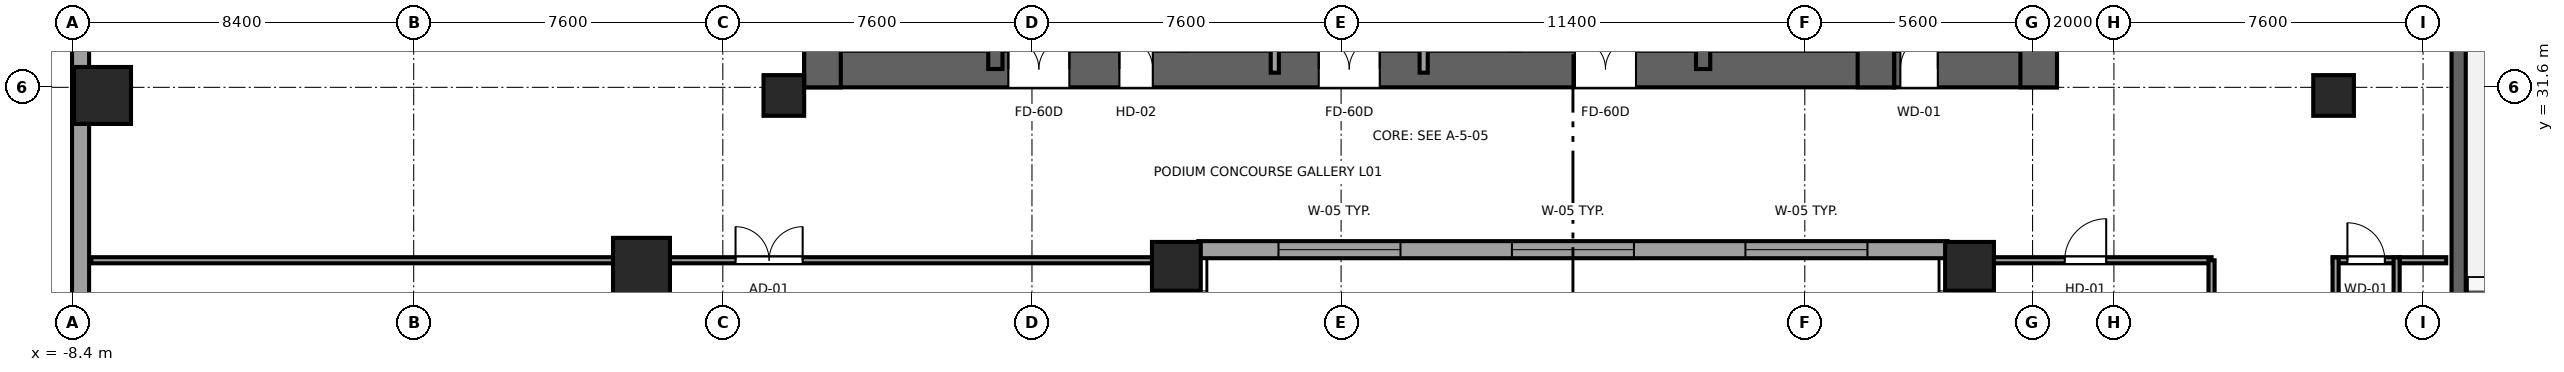
"""IFC4 building model, lengths in metres.
Left out: names, types, materials, properties, quantities, classifications, styles, units other than length and angle.
Written with IfcOpenShell. Run it as: python <this file> out.ifc"""

import sys

from ifc_helpers import new_model, si_unit, direction, frame, frame_2d, origin, origin_2d, place, context, subcontext, project, spatial, rectangle, circle, extrude, source, transform, mapped, element, fill, save


model = new_model("IFC4")
c1 = context("Model", 3, precision=1e-05, world=origin(), true_north=direction((0.0, 1.0)))
c2 = subcontext(c1, "Body", "Model", "MODEL_VIEW")
j1 = project(units=[si_unit("LENGTHUNIT", "METRE"), si_unit("PLANEANGLEUNIT", "RADIAN")], contexts=[c1])
p1 = place(None, origin())
s1 = spatial("IfcSite", under=j1, at=p1, CompositionType="ELEMENT")
p2 = place(p1, origin())
s2 = spatial("IfcBuilding", under=s1, at=p2, CompositionType="ELEMENT")
p3 = place(p2, frame((0.0, 0.0, 6.0)))
s3 = spatial("IfcBuildingStorey", under=s2, at=p3, CompositionType="ELEMENT", Elevation=6.0)
p4 = place(p3, frame((9.6, 32.05, 0.0), z_axis=(0.0, 0.0, 1.0), x_axis=(1.0, 0.0, 0.0)))
e1 = element("IfcWall", 1, at=p4, inside=s3, PredefinedType="SHEAR", context=c2, shape_type="SweptSolid", body=[
    extrude(rectangle(XDim=26.8, YDim=0.9, at=frame_2d((13.4, 0.0))), origin(), (0.0, 0.0, 1.0), 5.0),
])
p5 = place(p4, frame((6.52, 0.0, 0.0), z_axis=(0.0, 0.0, 1.0), x_axis=(-1.0, 0.0, 0.0)))
e2 = element("IfcOpeningElement", 2, at=p5, cuts=e1, PredefinedType="OPENING", context=c2, shape_type="SweptSolid", body=[
    extrude(rectangle(XDim=1.5, YDim=2.04, at=frame_2d((0.75, 1.02))), frame((0.0, 0.46, 0.0), z_axis=(0.0, -1.0, 0.0), x_axis=(1.0, 0.0, 0.0)), (0.0, 0.0, 1.0), 0.92),
])
p6 = place(p4, frame((14.15, 0.0, 0.0), z_axis=(0.0, 0.0, 1.0), x_axis=(-1.0, 0.0, 0.0)))
e3 = element("IfcOpeningElement", 3, at=p6, cuts=e1, PredefinedType="OPENING", context=c2, shape_type="SweptSolid", body=[
    extrude(rectangle(XDim=1.5, YDim=2.04, at=frame_2d((0.75, 1.02))), frame((0.0, 0.46, 0.0), z_axis=(0.0, -1.0, 0.0), x_axis=(1.0, 0.0, 0.0)), (0.0, 0.0, 1.0), 0.92),
])
p7 = place(p4, frame((20.45, 0.0, 0.0), z_axis=(0.0, 0.0, 1.0), x_axis=(-1.0, 0.0, 0.0)))
e4 = element("IfcOpeningElement", 4, at=p7, cuts=e1, PredefinedType="OPENING", context=c2, shape_type="SweptSolid", body=[
    extrude(rectangle(XDim=1.5, YDim=2.04, at=frame_2d((0.75, 1.02))), frame((0.0, 0.46, 0.0), z_axis=(0.0, -1.0, 0.0), x_axis=(1.0, 0.0, 0.0)), (0.0, 0.0, 1.0), 0.92),
])
p8 = place(p4, frame((8.57, 0.0, 0.0), z_axis=(0.0, 0.0, 1.0), x_axis=(-1.0, 0.0, 0.0)))
e5 = element("IfcOpeningElement", 5, at=p8, cuts=e1, PredefinedType="OPENING", context=c2, shape_type="SweptSolid", body=[
    extrude(rectangle(XDim=0.82, YDim=2.01, at=frame_2d((0.41, 1.005))), frame((0.0, 0.46, 0.0), z_axis=(0.0, -1.0, 0.0), x_axis=(1.0, 0.0, 0.0)), (0.0, 0.0, 1.0), 0.92),
])
for number, where, z_axis, x_axis in (
    (6, (10.05, 31.6, 0.0), (0.0, 0.0, 1.0), (0.0, 1.0, 0.0)),
    (7, (35.95, 31.6, 0.0), (0.0, 0.0, 1.0), (0.0, 1.0, 0.0)),
):
    element("IfcWall", number, at=place(p3, frame(where, z_axis=z_axis, x_axis=x_axis)), inside=s3, PredefinedType="SHEAR", context=c2, shape_type="SweptSolid", body=[
        extrude(rectangle(XDim=13.6, YDim=0.9, at=frame_2d((6.8, 0.0))), origin(), (0.0, 0.0, 1.0), 5.0),
    ])
p9 = place(p3, frame((14.3, 32.05, 0.0), z_axis=(0.0, 0.0, 1.0), x_axis=(0.0, 1.0, 0.0)))
e8 = element("IfcWall", 8, at=p9, inside=s3, PredefinedType="SHEAR", context=c2, shape_type="SweptSolid", body=[
    extrude(rectangle(XDim=12.7, YDim=0.35, at=frame_2d((6.35, 0.0))), origin(), (0.0, 0.0, 1.0), 5.0),
])
p10 = place(p9, frame((0.5, 0.0, 0.0)))
e9 = element("IfcOpeningElement", 9, at=p10, cuts=e8, PredefinedType="OPENING", context=c2, shape_type="SweptSolid", body=[
    extrude(rectangle(XDim=1.1, YDim=2.12, at=frame_2d((0.55, 1.06))), frame((0.0, 0.185, 0.0), z_axis=(0.0, -1.0, 0.0), x_axis=(1.0, 0.0, 0.0)), (0.0, 0.0, 1.0), 0.37),
])
p11 = place(p3, frame((31.7, 32.05, 0.0), z_axis=(0.0, 0.0, 1.0), x_axis=(0.0, 1.0, 0.0)))
e10 = element("IfcWall", 10, at=p11, inside=s3, PredefinedType="SHEAR", context=c2, shape_type="SweptSolid", body=[
    extrude(rectangle(XDim=12.7, YDim=0.35, at=frame_2d((6.35, 0.0))), origin(), (0.0, 0.0, 1.0), 5.0),
])
p12 = place(p11, frame((1.6, 0.0, 0.0), z_axis=(0.0, 0.0, 1.0), x_axis=(-1.0, 0.0, 0.0)))
e11 = element("IfcOpeningElement", 11, at=p12, cuts=e10, PredefinedType="OPENING", context=c2, shape_type="SweptSolid", body=[
    extrude(rectangle(XDim=1.1, YDim=2.12, at=frame_2d((0.55, 1.06))), frame((0.0, 0.185, 0.0), z_axis=(0.0, -1.0, 0.0), x_axis=(1.0, 0.0, 0.0)), (0.0, 0.0, 1.0), 0.37),
])
p13 = place(p3, frame((36.4, 32.05, 0.0), z_axis=(0.0, 0.0, 1.0), x_axis=(1.0, 0.0, 0.0)))
e12 = element("IfcWall", 12, at=p13, inside=s3, PredefinedType="SHEAR", context=c2, shape_type="SweptSolid", body=[
    extrude(rectangle(XDim=4.0, YDim=0.9, at=frame_2d((2.0, 0.0))), origin(), (0.0, 0.0, 1.0), 5.0),
])
p14 = place(p13, frame((1.07, 0.0, 0.0), z_axis=(0.0, 0.0, 1.0), x_axis=(-1.0, 0.0, 0.0)))
e13 = element("IfcOpeningElement", 13, at=p14, cuts=e12, PredefinedType="OPENING", context=c2, shape_type="SweptSolid", body=[
    extrude(rectangle(XDim=0.92, YDim=2.01, at=frame_2d((0.46, 1.005))), frame((0.0, 0.46, 0.0), z_axis=(0.0, -1.0, 0.0), x_axis=(1.0, 0.0, 0.0)), (0.0, 0.0, 1.0), 0.92),
])
p15 = place(p3, frame((39.95, 31.6, 0.0), z_axis=(0.0, 0.0, 1.0), x_axis=(0.0, 1.0, 0.0)))
e14 = element("IfcWall", 14, at=p15, inside=s3, PredefinedType="SHEAR", context=c2, shape_type="SweptSolid", body=[
    extrude(rectangle(XDim=13.6, YDim=0.9, at=frame_2d((6.8, 0.0))), origin(), (0.0, 0.0, 1.0), 5.0),
])
p16 = place(p3, frame((50.275, 32.975, 0.0), z_axis=(0.0, 0.0, 1.0), x_axis=(0.0, -1.0, 0.0)))
e15 = element("IfcWall", 15, at=p16, inside=s3, PredefinedType="SHEAR", context=c2, shape_type="SweptSolid", body=[
    extrude(rectangle(XDim=12.95, YDim=0.35, at=frame_2d((6.475, 0.0))), origin(), (0.0, 0.0, 1.0), 5.0),
])
m1 = source(origin(), c2, "Body", "SweptSolid", [
    extrude(rectangle(XDim=1.4, YDim=1.4, at=origin_2d()), origin(), (0.0, 0.0, 1.0), 5.0),
])
p17 = place(p3, frame((-7.65, 31.4, 0.0), z_axis=(0.0, 0.0, 1.0), x_axis=(1.0, 0.0, 0.0)))
e16 = element("IfcColumn", 16, at=p17, inside=s3, PredefinedType="COLUMN", context=c2, shape_type="MappedRepresentation", body=[
    mapped(m1, transform((0.0, 0.0, 0.0), x_axis=(1.0, 0.0, 0.0), y_axis=(0.0, 1.0, 0.0), z_axis=(0.0, 0.0, 1.0), scale=1.0)),
])
m2 = source(origin(), c2, "Body", "SweptSolid", [
    extrude(circle(Radius=0.6, at=origin_2d()), origin(), (0.0, 0.0, 1.0), 5.0),
])
for number, where, z_axis, x_axis in (
    (17, (18.75, 27.2, 0.0), (0.0, 0.0, 1.0), (1.0, 0.0, 0.0)),
    (18, (38.25, 27.2, 0.0), (0.0, 0.0, 1.0), (1.0, 0.0, 0.0)),
):
    element("IfcColumn", number, at=place(p3, frame(where, z_axis=z_axis, x_axis=x_axis)), inside=s3, PredefinedType="COLUMN", context=c2, shape_type="MappedRepresentation", body=[
        mapped(m2, transform((0.0, 0.0, 0.0), x_axis=(1.0, 0.0, 0.0), y_axis=(0.0, 1.0, 0.0), z_axis=(0.0, 0.0, 1.0), scale=1.0)),
    ])
m3 = source(origin(), c2, "Body", "SweptSolid", [
    extrude(rectangle(XDim=1.0, YDim=1.0, at=origin_2d()), origin(), (0.0, 0.0, 1.0), 5.0),
])
for number, where, z_axis, x_axis in (
    (19, (47.2, 31.4, 0.0), (0.0, 0.0, 1.0), (1.0, 0.0, 0.0)),
    (20, (9.1, 31.4, 0.0), (0.0, 0.0, 1.0), (1.0, 0.0, 0.0)),
):
    element("IfcColumn", number, at=place(p3, frame(where, z_axis=z_axis, x_axis=x_axis)), inside=s3, PredefinedType="COLUMN", context=c2, shape_type="MappedRepresentation", body=[
        mapped(m3, transform((0.0, 0.0, 0.0), x_axis=(1.0, 0.0, 0.0), y_axis=(0.0, 1.0, 0.0), z_axis=(0.0, 0.0, 1.0), scale=1.0)),
    ])
p18 = place(p3, frame((5.6, 27.2, 0.0), z_axis=(0.0, 0.0, 1.0), x_axis=(1.0, 0.0, 0.0)))
e21 = element("IfcColumn", 21, at=p18, inside=s3, PredefinedType="COLUMN", context=c2, shape_type="MappedRepresentation", body=[
    mapped(m1, transform((0.0, 0.0, 0.0), x_axis=(1.0, 0.0, 0.0), y_axis=(0.0, 1.0, 0.0), z_axis=(0.0, 0.0, 1.0), scale=1.0)),
])
p19 = place(p3, frame((19.29, 27.61, 0.0), z_axis=(0.0, 0.0, 1.0), x_axis=(1.0, 0.0, 0.0)))
e22 = element("IfcWall", 22, at=p19, inside=s3, PredefinedType="SOLIDWALL", context=c2, shape_type="SweptSolid", body=[
    extrude(rectangle(XDim=18.42, YDim=0.42, at=frame_2d((9.21, 0.0))), origin(), (0.0, 0.0, 1.0), 4.74),
])
p20 = place(p19, frame((1.97, 0.0, 0.65)))
e23 = element("IfcOpeningElement", 23, at=p20, cuts=e22, PredefinedType="OPENING", context=c2, shape_type="SweptSolid", body=[
    extrude(rectangle(XDim=3.0, YDim=2.5, at=frame_2d((1.5, 1.25))), frame((0.0, 0.22, 0.0), z_axis=(0.0, -1.0, 0.0), x_axis=(1.0, 0.0, 0.0)), (0.0, 0.0, 1.0), 0.44),
])
p21 = place(p19, frame((7.71, 0.0, 0.65)))
e24 = element("IfcOpeningElement", 24, at=p21, cuts=e22, PredefinedType="OPENING", context=c2, shape_type="SweptSolid", body=[
    extrude(rectangle(XDim=3.0, YDim=2.5, at=frame_2d((1.5, 1.25))), frame((0.0, 0.22, 0.0), z_axis=(0.0, -1.0, 0.0), x_axis=(1.0, 0.0, 0.0)), (0.0, 0.0, 1.0), 0.44),
])
p22 = place(p19, frame((13.45, 0.0, 0.65)))
e25 = element("IfcOpeningElement", 25, at=p22, cuts=e22, PredefinedType="OPENING", context=c2, shape_type="SweptSolid", body=[
    extrude(rectangle(XDim=3.0, YDim=2.5, at=frame_2d((1.5, 1.25))), frame((0.0, 0.22, 0.0), z_axis=(0.0, -1.0, 0.0), x_axis=(1.0, 0.0, 0.0)), (0.0, 0.0, 1.0), 0.44),
])
p23 = place(p3, frame((-8.19, 48.29, 0.0), z_axis=(0.0, 0.0, 1.0), x_axis=(0.0, -1.0, 0.0)))
e26 = element("IfcWall", 26, at=p23, inside=s3, PredefinedType="SOLIDWALL", context=c2, shape_type="SweptSolid", body=[
    extrude(rectangle(XDim=50.58, YDim=0.42, at=frame_2d((25.29, 0.0))), origin(), (0.0, 0.0, 1.0), 4.74),
])
p24 = place(p23, frame((5.834, 0.0, 0.65)))
e27 = element("IfcOpeningElement", 27, at=p24, cuts=e26, PredefinedType="OPENING", context=c2, shape_type="SweptSolid", body=[
    extrude(rectangle(XDim=3.0, YDim=2.5, at=frame_2d((1.5, 1.25))), frame((0.0, 0.22, 0.0), z_axis=(0.0, -1.0, 0.0), x_axis=(1.0, 0.0, 0.0)), (0.0, 0.0, 1.0), 0.44),
])
p25 = place(p23, frame((10.323, 0.0, 0.65)))
e28 = element("IfcOpeningElement", 28, at=p25, cuts=e26, PredefinedType="OPENING", context=c2, shape_type="SweptSolid", body=[
    extrude(rectangle(XDim=3.0, YDim=2.5, at=frame_2d((1.5, 1.25))), frame((0.0, 0.22, 0.0), z_axis=(0.0, -1.0, 0.0), x_axis=(1.0, 0.0, 0.0)), (0.0, 0.0, 1.0), 0.44),
])
p26 = place(p23, frame((24.84, 0.0, 0.65)))
e29 = element("IfcOpeningElement", 29, at=p26, cuts=e26, PredefinedType="OPENING", context=c2, shape_type="SweptSolid", body=[
    extrude(rectangle(XDim=3.0, YDim=2.5, at=frame_2d((1.5, 1.25))), frame((0.0, 0.22, 0.0), z_axis=(0.0, -1.0, 0.0), x_axis=(1.0, 0.0, 0.0)), (0.0, 0.0, 1.0), 0.44),
])
p27 = place(p23, frame((28.279, 0.0, 0.65)))
e30 = element("IfcOpeningElement", 30, at=p27, cuts=e26, PredefinedType="OPENING", context=c2, shape_type="SweptSolid", body=[
    extrude(rectangle(XDim=3.0, YDim=2.5, at=frame_2d((1.5, 1.25))), frame((0.0, 0.22, 0.0), z_axis=(0.0, -1.0, 0.0), x_axis=(1.0, 0.0, 0.0)), (0.0, 0.0, 1.0), 0.44),
])
p28 = place(p23, frame((33.318, 0.0, 0.65)))
e31 = element("IfcOpeningElement", 31, at=p28, cuts=e26, PredefinedType="OPENING", context=c2, shape_type="SweptSolid", body=[
    extrude(rectangle(XDim=3.0, YDim=2.5, at=frame_2d((1.5, 1.25))), frame((0.0, 0.22, 0.0), z_axis=(0.0, -1.0, 0.0), x_axis=(1.0, 0.0, 0.0)), (0.0, 0.0, 1.0), 0.44),
])
p29 = place(p23, frame((41.746, 0.0, 0.65)))
e32 = element("IfcOpeningElement", 32, at=p29, cuts=e26, PredefinedType="OPENING", context=c2, shape_type="SweptSolid", body=[
    extrude(rectangle(XDim=3.0, YDim=2.5, at=frame_2d((1.5, 1.25))), frame((0.0, 0.22, 0.0), z_axis=(0.0, -1.0, 0.0), x_axis=(1.0, 0.0, 0.0)), (0.0, 0.0, 1.0), 0.44),
])
for number, where, z_axis, x_axis in (
    (33, (21.17, 31.96, 0.0), (0.0, 0.0, 1.0), (0.0, 1.0, 0.0)),
    (34, (24.83, 31.96, 0.0), (0.0, 0.0, 1.0), (0.0, 1.0, 0.0)),
):
    element("IfcWall", number, at=place(p3, frame(where, z_axis=z_axis, x_axis=x_axis)), inside=s3, PredefinedType="SOLIDWALL", context=c2, shape_type="SweptSolid", body=[
        extrude(rectangle(XDim=12.58, YDim=0.2, at=frame_2d((6.29, 0.0))), origin(), (0.0, 0.0, 1.0), 4.74),
    ])
p30 = place(p3, frame((-7.925, 27.35, 0.0), z_axis=(0.0, 0.0, 1.0), x_axis=(1.0, 0.0, 0.0)))
e35 = element("IfcWall", 35, at=p30, inside=s3, PredefinedType="PARTITIONING", context=c2, shape_type="SweptSolid", body=[
    extrude(rectangle(XDim=26.925, YDim=0.15, at=frame_2d((13.462, 0.0))), origin(), (0.0, 0.0, 1.0), 3.53),
])
p31 = place(p30, frame((15.837, 0.0, 0.0)))
e36 = element("IfcOpeningElement", 36, at=p31, cuts=e35, PredefinedType="OPENING", context=c2, shape_type="SweptSolid", body=[
    extrude(rectangle(XDim=1.65, YDim=2.15, at=frame_2d((0.825, 1.075))), frame((0.0, 0.085, 0.0), z_axis=(0.0, -1.0, 0.0), x_axis=(1.0, 0.0, 0.0)), (0.0, 0.0, 1.0), 0.17),
])
p32 = place(p3, frame((19.0, -2.025, 0.0), z_axis=(0.0, 0.0, 1.0), x_axis=(0.0, 1.0, 0.0)))
e37 = element("IfcWall", 37, at=p32, inside=s3, PredefinedType="PARTITIONING", context=c2, shape_type="SweptSolid", body=[
    extrude(rectangle(XDim=29.425, YDim=0.15, at=frame_2d((14.712, 0.0))), origin(), (0.0, 0.0, 1.0), 4.74),
])
p33 = place(p3, frame((38.0, 27.35, 0.0), z_axis=(0.0, 0.0, 1.0), x_axis=(1.0, 0.0, 0.0)))
e38 = element("IfcWall", 38, at=p33, inside=s3, PredefinedType="PARTITIONING", context=c2, shape_type="SweptSolid", body=[
    extrude(rectangle(XDim=6.2, YDim=0.15, at=frame_2d((3.1, 0.0))), origin(), (0.0, 0.0, 1.0), 4.74),
])
p34 = place(p33, frame((2.59, 0.0, 0.0)))
e39 = element("IfcOpeningElement", 39, at=p34, cuts=e38, PredefinedType="OPENING", context=c2, shape_type="SweptSolid", body=[
    extrude(rectangle(XDim=1.02, YDim=2.03, at=frame_2d((0.51, 1.015))), frame((0.0, 0.085, 0.0), z_axis=(0.0, -1.0, 0.0), x_axis=(1.0, 0.0, 0.0)), (0.0, 0.0, 1.0), 0.17),
])
p35 = place(p3, frame((38.0, 20.0, 0.0), z_axis=(0.0, 0.0, 1.0), x_axis=(0.0, 1.0, 0.0)))
e40 = element("IfcWall", 40, at=p35, inside=s3, PredefinedType="PARTITIONING", context=c2, shape_type="SweptSolid", body=[
    extrude(rectangle(XDim=7.4, YDim=0.15, at=frame_2d((3.7, 0.0))), origin(), (0.0, 0.0, 1.0), 4.74),
])
p36 = place(p3, frame((44.2, 20.0, 0.0), z_axis=(0.0, 0.0, 1.0), x_axis=(0.0, 1.0, 0.0)))
e41 = element("IfcWall", 41, at=p36, inside=s3, PredefinedType="PARTITIONING", context=c2, shape_type="SweptSolid", body=[
    extrude(rectangle(XDim=7.35, YDim=0.15, at=frame_2d((3.675, 0.0))), origin(), (0.0, 0.0, 1.0), 4.276),
])
p37 = place(p3, frame((47.18, 27.35, 0.0), z_axis=(0.0, 0.0, 1.0), x_axis=(1.0, 0.0, 0.0)))
e42 = element("IfcWall", 42, at=p37, inside=s3, PredefinedType="PARTITIONING", context=c2, shape_type="SweptSolid", body=[
    extrude(rectangle(XDim=1.64, YDim=0.15, at=frame_2d((0.82, 0.0))), origin(), (0.0, 0.0, 1.0), 4.74),
])
p38 = place(p37, frame((0.36, 0.0, 0.0)))
e43 = element("IfcOpeningElement", 43, at=p38, cuts=e42, PredefinedType="OPENING", context=c2, shape_type="SweptSolid", body=[
    extrude(rectangle(XDim=0.92, YDim=2.01, at=frame_2d((0.46, 1.005))), frame((0.0, 0.085, 0.0), z_axis=(0.0, -1.0, 0.0), x_axis=(1.0, 0.0, 0.0)), (0.0, 0.0, 1.0), 0.17),
])
p39 = place(p3, frame((47.25, 19.98, 0.0), z_axis=(0.0, 0.0, 1.0), x_axis=(0.0, 1.0, 0.0)))
e44 = element("IfcWall", 44, at=p39, inside=s3, PredefinedType="PARTITIONING", context=c2, shape_type="SweptSolid", body=[
    extrude(rectangle(XDim=7.44, YDim=0.15, at=frame_2d((3.72, 0.0))), origin(), (0.0, 0.0, 1.0), 3.914),
])
p40 = place(p3, frame((48.75, 19.98, 0.0), z_axis=(0.0, 0.0, 1.0), x_axis=(0.0, 1.0, 0.0)))
e45 = element("IfcWall", 45, at=p40, inside=s3, PredefinedType="PARTITIONING", context=c2, shape_type="SweptSolid", body=[
    extrude(rectangle(XDim=7.44, YDim=0.15, at=frame_2d((3.72, 0.0))), origin(), (0.0, 0.0, 1.0), 4.74),
])
p41 = place(p40, frame((2.66, 0.0, 0.0)))
e46 = element("IfcOpeningElement", 46, at=p41, cuts=e45, PredefinedType="OPENING", context=c2, shape_type="SweptSolid", body=[
    extrude(rectangle(XDim=0.92, YDim=2.01, at=frame_2d((0.46, 1.005))), frame((0.0, 0.085, 0.0), z_axis=(0.0, -1.0, 0.0), x_axis=(1.0, 0.0, 0.0)), (0.0, 0.0, 1.0), 0.17),
])
p42 = place(p3, frame((48.83, 27.35, 0.0), z_axis=(0.0, 0.0, 1.0), x_axis=(1.0, 0.0, 0.0)))
e47 = element("IfcWall", 47, at=p42, inside=s3, PredefinedType="PARTITIONING", context=c2, shape_type="SweptSolid", body=[
    extrude(rectangle(XDim=1.14, YDim=0.15, at=frame_2d((0.57, 0.0))), origin(), (0.0, 0.0, 1.0), 4.74),
])
m4 = source(origin(), c2, "Body", "SweptSolid", [
    extrude(rectangle(XDim=3.0, YDim=2.5, at=frame_2d((1.5, 1.25))), frame((0.0, 0.09, 0.0), z_axis=(0.0, -1.0, 0.0), x_axis=(1.0, 0.0, 0.0)), (0.0, 0.0, 1.0), 0.06),
])
p43 = place(p20, origin())
e48 = element("IfcWindow", 48, at=p43, inside=s3, PartitioningType="TRIPLE_PANEL_HORIZONTAL", PredefinedType="WINDOW", context=c2, shape_type="MappedRepresentation", body=[
    mapped(m4, transform((0.0, 0.0, 0.0), x_axis=(1.0, 0.0, 0.0), y_axis=(0.0, 1.0, 0.0), z_axis=(0.0, 0.0, 1.0), scale=1.0)),
])
fill(e23, e48)
p44 = place(p21, origin())
e49 = element("IfcWindow", 49, at=p44, inside=s3, PartitioningType="TRIPLE_PANEL_HORIZONTAL", PredefinedType="WINDOW", context=c2, shape_type="MappedRepresentation", body=[
    mapped(m4, transform((0.0, 0.0, 0.0), x_axis=(1.0, 0.0, 0.0), y_axis=(0.0, 1.0, 0.0), z_axis=(0.0, 0.0, 1.0), scale=1.0)),
])
fill(e24, e49)
p45 = place(p22, origin())
e50 = element("IfcWindow", 50, at=p45, inside=s3, PartitioningType="TRIPLE_PANEL_HORIZONTAL", PredefinedType="WINDOW", context=c2, shape_type="MappedRepresentation", body=[
    mapped(m4, transform((0.0, 0.0, 0.0), x_axis=(1.0, 0.0, 0.0), y_axis=(0.0, 1.0, 0.0), z_axis=(0.0, 0.0, 1.0), scale=1.0)),
])
fill(e25, e50)
m5 = source(origin(), c2, "Body", "SweptSolid", [
    extrude(rectangle(XDim=1.5, YDim=2.04, at=frame_2d((0.75, 1.02))), frame((0.0, 0.025, 0.0), z_axis=(0.0, -1.0, 0.0), x_axis=(1.0, 0.0, 0.0)), (0.0, 0.0, 1.0), 0.05),
])
p46 = place(p5, origin())
e51 = element("IfcDoor", 51, at=p46, inside=s3, OperationType="DOUBLE_DOOR_SINGLE_SWING", PredefinedType="DOOR", context=c2, shape_type="MappedRepresentation", body=[
    mapped(m5, transform((0.0, 0.0, 0.0), x_axis=(1.0, 0.0, 0.0), y_axis=(0.0, 1.0, 0.0), z_axis=(0.0, 0.0, 1.0), scale=1.0)),
])
fill(e2, e51)
p47 = place(p6, origin())
e52 = element("IfcDoor", 52, at=p47, inside=s3, OperationType="DOUBLE_DOOR_SINGLE_SWING", PredefinedType="DOOR", context=c2, shape_type="MappedRepresentation", body=[
    mapped(m5, transform((0.0, 0.0, 0.0), x_axis=(1.0, 0.0, 0.0), y_axis=(0.0, 1.0, 0.0), z_axis=(0.0, 0.0, 1.0), scale=1.0)),
])
fill(e3, e52)
p48 = place(p7, origin())
e53 = element("IfcDoor", 53, at=p48, inside=s3, OperationType="DOUBLE_DOOR_SINGLE_SWING", PredefinedType="DOOR", context=c2, shape_type="MappedRepresentation", body=[
    mapped(m5, transform((0.0, 0.0, 0.0), x_axis=(1.0, 0.0, 0.0), y_axis=(0.0, 1.0, 0.0), z_axis=(0.0, 0.0, 1.0), scale=1.0)),
])
fill(e4, e53)
m6 = source(origin(), c2, "Body", "SweptSolid", [
    extrude(rectangle(XDim=0.82, YDim=2.01, at=frame_2d((0.41, 1.005))), frame((0.0, 0.025, 0.0), z_axis=(0.0, -1.0, 0.0), x_axis=(1.0, 0.0, 0.0)), (0.0, 0.0, 1.0), 0.05),
])
p49 = place(p8, origin())
e54 = element("IfcDoor", 54, at=p49, inside=s3, OperationType="SINGLE_SWING_LEFT", PredefinedType="DOOR", context=c2, shape_type="MappedRepresentation", body=[
    mapped(m6, transform((0.0, 0.0, 0.0), x_axis=(1.0, 0.0, 0.0), y_axis=(0.0, 1.0, 0.0), z_axis=(0.0, 0.0, 1.0), scale=1.0)),
])
fill(e5, e54)
m7 = source(origin(), c2, "Body", "SweptSolid", [
    extrude(rectangle(XDim=0.92, YDim=2.01, at=frame_2d((0.46, 1.005))), frame((0.0, 0.025, 0.0), z_axis=(0.0, -1.0, 0.0), x_axis=(1.0, 0.0, 0.0)), (0.0, 0.0, 1.0), 0.05),
])
p50 = place(p14, origin())
e55 = element("IfcDoor", 55, at=p50, inside=s3, OperationType="SINGLE_SWING_RIGHT", PredefinedType="DOOR", context=c2, shape_type="MappedRepresentation", body=[
    mapped(m7, transform((0.0, 0.0, 0.0), x_axis=(1.0, 0.0, 0.0), y_axis=(0.0, 1.0, 0.0), z_axis=(0.0, 0.0, 1.0), scale=1.0)),
])
fill(e13, e55)
m8 = source(origin(), c2, "Body", "SweptSolid", [
    extrude(rectangle(XDim=1.65, YDim=2.15, at=frame_2d((0.825, 1.075))), frame((0.0, 0.025, 0.0), z_axis=(0.0, -1.0, 0.0), x_axis=(1.0, 0.0, 0.0)), (0.0, 0.0, 1.0), 0.05),
])
p51 = place(p31, origin())
e56 = element("IfcDoor", 56, at=p51, inside=s3, OperationType="DOUBLE_DOOR_SINGLE_SWING", PredefinedType="DOOR", context=c2, shape_type="MappedRepresentation", body=[
    mapped(m8, transform((0.0, 0.0, 0.0), x_axis=(1.0, 0.0, 0.0), y_axis=(0.0, 1.0, 0.0), z_axis=(0.0, 0.0, 1.0), scale=1.0)),
])
fill(e36, e56)
m9 = source(origin(), c2, "Body", "SweptSolid", [
    extrude(rectangle(XDim=1.02, YDim=2.03, at=frame_2d((0.51, 1.015))), frame((0.0, 0.025, 0.0), z_axis=(0.0, -1.0, 0.0), x_axis=(1.0, 0.0, 0.0)), (0.0, 0.0, 1.0), 0.05),
])
p52 = place(p34, origin())
e57 = element("IfcDoor", 57, at=p52, inside=s3, OperationType="SINGLE_SWING_RIGHT", PredefinedType="DOOR", context=c2, shape_type="MappedRepresentation", body=[
    mapped(m9, transform((0.0, 0.0, 0.0), x_axis=(1.0, 0.0, 0.0), y_axis=(0.0, 1.0, 0.0), z_axis=(0.0, 0.0, 1.0), scale=1.0)),
])
fill(e39, e57)
p53 = place(p38, origin())
e58 = element("IfcDoor", 58, at=p53, inside=s3, OperationType="SINGLE_SWING_LEFT", PredefinedType="DOOR", context=c2, shape_type="MappedRepresentation", body=[
    mapped(m7, transform((0.0, 0.0, 0.0), x_axis=(1.0, 0.0, 0.0), y_axis=(0.0, 1.0, 0.0), z_axis=(0.0, 0.0, 1.0), scale=1.0)),
])
fill(e43, e58)
save(model, sys.argv[1])
